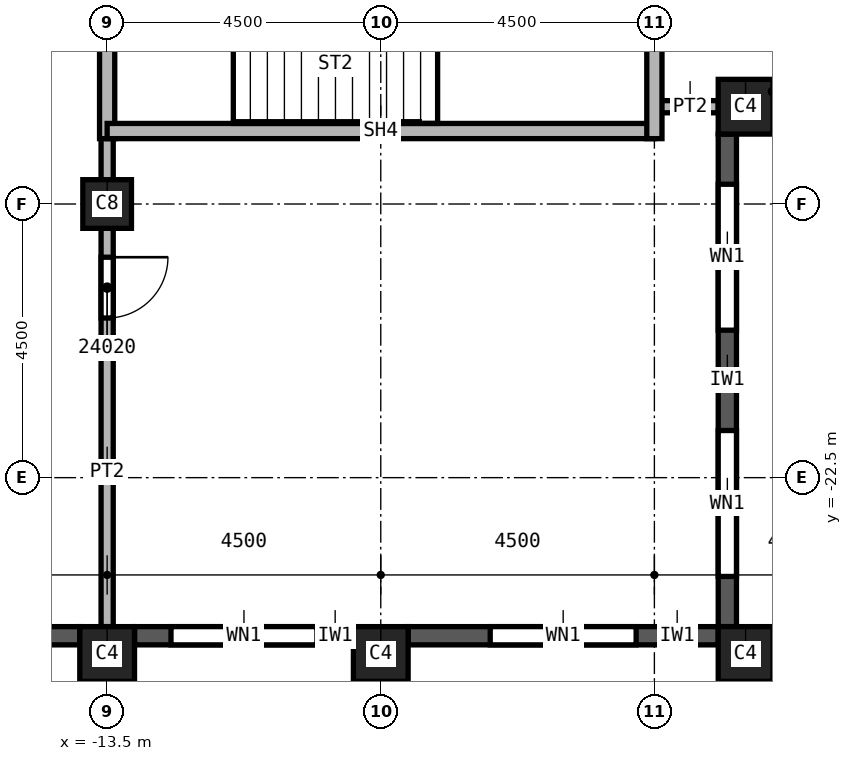
"""IFC4 building model, lengths in metres.
Left out: names, types, materials, properties, quantities, classifications, styles, units other than length and angle.
Written with IfcOpenShell. Run it as: python <this file> out.ifc"""

import sys

from ifc_helpers import new_model, si_unit, direction, frame, frame_2d, origin, origin_2d, place, context, subcontext, project, spatial, rectangle, extrude, element, fill, save


model = new_model("IFC4")
c1 = context("Model", 3, precision=1e-05, world=origin(), true_north=direction((0.0, 1.0)))
c2 = subcontext(c1, "Body", "Model", "MODEL_VIEW")
j1 = project(units=[si_unit("LENGTHUNIT", "METRE"), si_unit("PLANEANGLEUNIT", "RADIAN")], contexts=[c1])
p1 = place(None, origin())
s1 = spatial("IfcSite", under=j1, at=p1, CompositionType="ELEMENT")
p2 = place(p1, origin())
s2 = spatial("IfcBuilding", under=s1, at=p2, CompositionType="ELEMENT")
p3 = place(p2, frame((0.0, 0.0, 338.0)))
s3 = spatial("IfcBuildingStorey", under=s2, at=p3, CompositionType="ELEMENT", Elevation=338.0)
p4 = place(p3, frame((-13.5, -18.0, 0.0), z_axis=(0.0, 0.0, 1.0), x_axis=(1.0, 0.0, 0.0)))
e1 = element("IfcColumn", 1, at=p4, inside=s3, PredefinedType="COLUMN", context=c2, shape_type="SweptSolid", body=[
    extrude(rectangle(XDim=0.8, YDim=0.8, at=origin_2d()), origin(), (0.0, 0.0, 1.0), 3.74),
])
for number, where, z_axis, x_axis in (
    (2, (-3.0, -25.4, 0.0), (0.0, 0.0, 1.0), (1.0, 0.0, 0.0)),
    (3, (-9.0, -25.4, 0.0), (0.0, 0.0, 1.0), (1.0, 0.0, 0.0)),
    (4, (-13.5, -25.4, 0.0), (0.0, 0.0, 1.0), (1.0, 0.0, 0.0)),
    (5, (-3.0, -16.4, 0.0), (0.0, 0.0, 1.0), (1.0, 0.0, 0.0)),
):
    element("IfcColumn", number, at=place(p3, frame(where, z_axis=z_axis, x_axis=x_axis)), inside=s3, PredefinedType="COLUMN", context=c2, shape_type="SweptSolid", body=[
        extrude(rectangle(XDim=0.9, YDim=0.9, at=origin_2d()), origin(), (0.0, 0.0, 1.0), 3.74),
    ])
p5 = place(p3, frame((-17.55, -25.1, 0.0), z_axis=(0.0, 0.0, 1.0), x_axis=(1.0, 0.0, 0.0)))
e6 = element("IfcWall", 6, at=p5, inside=s3, PredefinedType="SOLIDWALL", context=c2, shape_type="SweptSolid", body=[
    extrude(rectangle(XDim=3.6, YDim=0.3, at=frame_2d((1.8, 0.0))), origin(), (0.0, 0.0, 1.0), 3.14),
])
p6 = place(p5, frame((0.775, 0.0, 0.8)))
e7 = element("IfcOpeningElement", 7, at=p6, cuts=e6, PredefinedType="OPENING", context=c2, shape_type="SweptSolid", body=[
    extrude(rectangle(XDim=1.0, YDim=1.95, at=frame_2d((0.5, 0.975))), frame((0.0, 0.15, 0.0), z_axis=(0.0, -1.0, 0.0), x_axis=(1.0, 0.0, 0.0)), (0.0, 0.0, 1.0), 0.3),
])
p7 = place(p5, frame((2.375, 0.0, 0.8)))
e8 = element("IfcOpeningElement", 8, at=p7, cuts=e6, PredefinedType="OPENING", context=c2, shape_type="SweptSolid", body=[
    extrude(rectangle(XDim=0.6, YDim=1.95, at=frame_2d((0.3, 0.975))), frame((0.0, 0.15, 0.0), z_axis=(0.0, -1.0, 0.0), x_axis=(1.0, 0.0, 0.0)), (0.0, 0.0, 1.0), 0.3),
])
p8 = place(p3, frame((-13.05, -25.1, 0.0), z_axis=(0.0, 0.0, 1.0), x_axis=(1.0, 0.0, 0.0)))
e9 = element("IfcWall", 9, at=p8, inside=s3, PredefinedType="SOLIDWALL", context=c2, shape_type="SweptSolid", body=[
    extrude(rectangle(XDim=3.6, YDim=0.3, at=frame_2d((1.8, 0.0))), origin(), (0.0, 0.0, 1.0), 3.14),
])
p9 = place(p8, frame((0.6, 0.0, 0.8)))
e10 = element("IfcOpeningElement", 10, at=p9, cuts=e9, PredefinedType="OPENING", context=c2, shape_type="SweptSolid", body=[
    extrude(rectangle(XDim=2.4, YDim=1.95, at=frame_2d((1.2, 0.975))), frame((0.0, 0.15, 0.0), z_axis=(0.0, -1.0, 0.0), x_axis=(1.0, 0.0, 0.0)), (0.0, 0.0, 1.0), 0.3),
])
p10 = place(p3, frame((-8.55, -25.1, 0.0), z_axis=(0.0, 0.0, 1.0), x_axis=(1.0, 0.0, 0.0)))
e11 = element("IfcWall", 11, at=p10, inside=s3, PredefinedType="SOLIDWALL", context=c2, shape_type="SweptSolid", body=[
    extrude(rectangle(XDim=5.1, YDim=0.3, at=frame_2d((2.55, 0.0))), origin(), (0.0, 0.0, 1.0), 3.14),
])
p11 = place(p10, frame((1.35, 0.0, 0.8)))
e12 = element("IfcOpeningElement", 12, at=p11, cuts=e11, PredefinedType="OPENING", context=c2, shape_type="SweptSolid", body=[
    extrude(rectangle(XDim=2.4, YDim=1.95, at=frame_2d((1.2, 0.975))), frame((0.0, 0.15, 0.0), z_axis=(0.0, -1.0, 0.0), x_axis=(1.0, 0.0, 0.0)), (0.0, 0.0, 1.0), 0.3),
])
p12 = place(p3, frame((-3.3, -24.95, 0.0), z_axis=(0.0, 0.0, 1.0), x_axis=(0.0, 1.0, 0.0)))
e13 = element("IfcWall", 13, at=p12, inside=s3, PredefinedType="SOLIDWALL", context=c2, shape_type="SweptSolid", body=[
    extrude(rectangle(XDim=8.1, YDim=0.3, at=frame_2d((4.05, 0.0))), origin(), (0.0, 0.0, 1.0), 3.14),
])
p13 = place(p12, frame((0.825, 0.0, 0.8)))
e14 = element("IfcOpeningElement", 14, at=p13, cuts=e13, PredefinedType="OPENING", context=c2, shape_type="SweptSolid", body=[
    extrude(rectangle(XDim=2.4, YDim=1.95, at=frame_2d((1.2, 0.975))), frame((0.0, 0.15, 0.0), z_axis=(0.0, -1.0, 0.0), x_axis=(1.0, 0.0, 0.0)), (0.0, 0.0, 1.0), 0.3),
])
p14 = place(p12, frame((4.875, 0.0, 0.8)))
e15 = element("IfcOpeningElement", 15, at=p14, cuts=e13, PredefinedType="OPENING", context=c2, shape_type="SweptSolid", body=[
    extrude(rectangle(XDim=2.4, YDim=1.95, at=frame_2d((1.2, 0.975))), frame((0.0, 0.15, 0.0), z_axis=(0.0, -1.0, 0.0), x_axis=(1.0, 0.0, 0.0)), (0.0, 0.0, 1.0), 0.3),
])
p15 = place(p3, frame((-13.5, -16.675, 0.0), z_axis=(0.0, 0.0, 1.0), x_axis=(0.0, -1.0, 0.0)))
e16 = element("IfcWall", 16, at=p15, inside=s3, PredefinedType="PARTITIONING", context=c2, shape_type="SweptSolid", body=[
    extrude(rectangle(XDim=8.275, YDim=0.2, at=frame_2d((4.137, 0.0))), origin(), (0.0, 0.0, 1.0), 3.74),
])
p16 = place(p15, frame((2.2, 0.0, 0.0)))
e17 = element("IfcOpeningElement", 17, at=p16, cuts=e16, PredefinedType="OPENING", context=c2, shape_type="SweptSolid", body=[
    extrude(rectangle(XDim=1.0, YDim=2.1, at=frame_2d((0.5, 1.05))), frame((0.0, 0.1, 0.0), z_axis=(0.0, -1.0, 0.0), x_axis=(1.0, 0.0, 0.0)), (0.0, 0.0, 1.0), 0.2),
])
p17 = place(p3, frame((-3.45, -16.4, 0.0), z_axis=(0.0, 0.0, 1.0), x_axis=(-1.0, 0.0, 0.0)))
e18 = element("IfcWall", 18, at=p17, inside=s3, PredefinedType="PARTITIONING", context=c2, shape_type="SweptSolid", body=[
    extrude(rectangle(XDim=1.05, YDim=0.2, at=frame_2d((0.525, 0.0))), origin(), (0.0, 0.0, 1.0), 3.74),
])
p18 = place(p3, frame((-13.5, -12.175, 0.0), z_axis=(0.0, 0.0, 1.0), x_axis=(0.0, -1.0, 0.0)))
e19 = element("IfcWall", 19, at=p18, inside=s3, PredefinedType="SOLIDWALL", context=c2, shape_type="SweptSolid", body=[
    extrude(rectangle(XDim=4.75, YDim=0.25, at=frame_2d((2.375, 0.0))), origin(), (0.0, 0.0, 1.0), 3.74),
])
p19 = place(p3, frame((-4.5, -16.8, 0.0), z_axis=(0.0, 0.0, 1.0), x_axis=(-1.0, 0.0, 0.0)))
e20 = element("IfcWall", 20, at=p19, inside=s3, PredefinedType="SOLIDWALL", context=c2, shape_type="SweptSolid", body=[
    extrude(rectangle(XDim=9.0, YDim=0.25, at=frame_2d((4.5, 0.0))), origin(), (0.0, 0.0, 1.0), 3.74),
])
p20 = place(p3, frame((-4.5, -12.3, 0.0), z_axis=(0.0, 0.0, 1.0), x_axis=(0.0, -1.0, 0.0)))
e21 = element("IfcWall", 21, at=p20, inside=s3, PredefinedType="SOLIDWALL", context=c2, shape_type="SweptSolid", body=[
    extrude(rectangle(XDim=4.625, YDim=0.25, at=frame_2d((2.312, 0.0))), origin(), (0.0, 0.0, 1.0), 3.74),
])
p21 = place(p9, origin())
e22 = element("IfcWindow", 22, at=p21, inside=s3, PartitioningType="SINGLE_PANEL", PredefinedType="WINDOW", context=c2, shape_type="SweptSolid", body=[
    extrude(rectangle(XDim=2.4, YDim=1.95, at=frame_2d((1.2, 0.975))), frame((0.0, 0.03, 0.0), z_axis=(0.0, -1.0, 0.0), x_axis=(1.0, 0.0, 0.0)), (0.0, 0.0, 1.0), 0.06),
])
fill(e10, e22)
p22 = place(p11, origin())
e23 = element("IfcWindow", 23, at=p22, inside=s3, PartitioningType="SINGLE_PANEL", PredefinedType="WINDOW", context=c2, shape_type="SweptSolid", body=[
    extrude(rectangle(XDim=2.4, YDim=1.95, at=frame_2d((1.2, 0.975))), frame((0.0, 0.03, 0.0), z_axis=(0.0, -1.0, 0.0), x_axis=(1.0, 0.0, 0.0)), (0.0, 0.0, 1.0), 0.06),
])
fill(e12, e23)
p23 = place(p13, origin())
e24 = element("IfcWindow", 24, at=p23, inside=s3, PartitioningType="SINGLE_PANEL", PredefinedType="WINDOW", context=c2, shape_type="SweptSolid", body=[
    extrude(rectangle(XDim=2.4, YDim=1.95, at=frame_2d((1.2, 0.975))), frame((0.0, 0.03, 0.0), z_axis=(0.0, -1.0, 0.0), x_axis=(1.0, 0.0, 0.0)), (0.0, 0.0, 1.0), 0.06),
])
fill(e14, e24)
p24 = place(p14, origin())
e25 = element("IfcWindow", 25, at=p24, inside=s3, PartitioningType="SINGLE_PANEL", PredefinedType="WINDOW", context=c2, shape_type="SweptSolid", body=[
    extrude(rectangle(XDim=2.4, YDim=1.95, at=frame_2d((1.2, 0.975))), frame((0.0, 0.03, 0.0), z_axis=(0.0, -1.0, 0.0), x_axis=(1.0, 0.0, 0.0)), (0.0, 0.0, 1.0), 0.06),
])
fill(e15, e25)
p25 = place(p16, origin())
e26 = element("IfcDoor", 26, at=p25, inside=s3, OperationType="SINGLE_SWING_LEFT", PredefinedType="DOOR", context=c2, shape_type="SweptSolid", body=[
    extrude(rectangle(XDim=1.0, YDim=2.1, at=frame_2d((0.5, 1.05))), frame((0.0, 0.025, 0.0), z_axis=(0.0, -1.0, 0.0), x_axis=(1.0, 0.0, 0.0)), (0.0, 0.0, 1.0), 0.05),
])
fill(e17, e26)
save(model, sys.argv[1])
